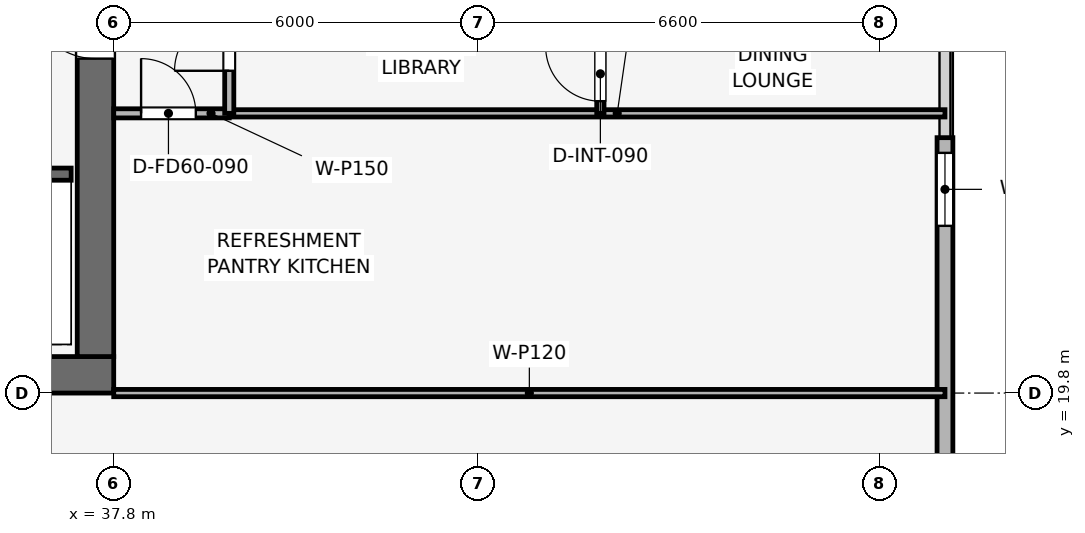
"""IFC4 building model, lengths in metres.
Left out: names, types, materials, properties, quantities, classifications, styles, units other than length and angle.
Written with IfcOpenShell. Run it as: python <this file> out.ifc"""

import sys

from ifc_helpers import new_model, si_unit, direction, frame, frame_2d, origin, place, context, subcontext, project, spatial, rectangle, extrude, element, fill, save


model = new_model("IFC4")
c1 = context("Model", 3, precision=1e-05, world=origin(), true_north=direction((0.0, 1.0)))
c2 = subcontext(c1, "Body", "Model", "MODEL_VIEW")
j1 = project(units=[si_unit("LENGTHUNIT", "METRE"), si_unit("PLANEANGLEUNIT", "RADIAN")], contexts=[c1])
p1 = place(None, origin())
s1 = spatial("IfcSite", under=j1, at=p1, CompositionType="ELEMENT")
p2 = place(p1, origin())
s2 = spatial("IfcBuilding", under=s1, at=p2, CompositionType="ELEMENT")
p3 = place(p2, frame((0.0, 0.0, 318.0)))
s3 = spatial("IfcBuildingStorey", under=s2, at=p3, CompositionType="ELEMENT", Elevation=318.0)
p4 = place(p3, frame((19.8, 20.1, 0.0), z_axis=(0.0, 0.0, 1.0), x_axis=(1.0, 0.0, 0.0)))
e1 = element("IfcWall", 1, at=p4, inside=s3, PredefinedType="SHEAR", context=c2, shape_type="SweptSolid", body=[
    extrude(rectangle(XDim=18.0, YDim=0.6, at=frame_2d((9.0, 0.0))), origin(), (0.0, 0.0, 1.0), 3.75),
])
p5 = place(p3, frame((37.5, 20.4, 0.0), z_axis=(0.0, 0.0, 1.0), x_axis=(0.0, 1.0, 0.0)))
e2 = element("IfcWall", 2, at=p5, inside=s3, PredefinedType="SHEAR", context=c2, shape_type="SweptSolid", body=[
    extrude(rectangle(XDim=16.8, YDim=0.6, at=frame_2d((8.4, 0.0))), origin(), (0.0, 0.0, 1.0), 3.75),
])
p6 = place(p5, frame((4.9, 0.0, 0.0)))
e3 = element("IfcOpeningElement", 3, at=p6, cuts=e2, PredefinedType="OPENING", context=c2, shape_type="SweptSolid", body=[
    extrude(rectangle(XDim=1.1, YDim=2.15, at=frame_2d((0.55, 1.075))), frame((0.0, 0.31, 0.0), z_axis=(0.0, -1.0, 0.0), x_axis=(1.0, 0.0, 0.0)), (0.0, 0.0, 1.0), 0.62),
])
p7 = place(p3, frame((51.47, 24.0, 0.0), z_axis=(0.0, 0.0, 1.0), x_axis=(0.0, -1.0, 0.0)))
e4 = element("IfcWall", 4, at=p7, inside=s3, PredefinedType="SOLIDWALL", context=c2, shape_type="SweptSolid", body=[
    extrude(rectangle(XDim=11.7, YDim=0.26, at=frame_2d((5.85, 0.0))), origin(), (0.0, 0.0, 1.0), 3.51),
])
p8 = place(p7, frame((0.25, 0.0, 0.9)))
e5 = element("IfcOpeningElement", 5, at=p8, cuts=e4, PredefinedType="OPENING", context=c2, shape_type="SweptSolid", body=[
    extrude(rectangle(XDim=1.2, YDim=2.1, at=frame_2d((0.6, 1.05))), frame((0.0, 0.14, 0.0), z_axis=(0.0, -1.0, 0.0), x_axis=(1.0, 0.0, 0.0)), (0.0, 0.0, 1.0), 0.28),
])
p9 = place(p3, frame((34.05, 23.4, 0.0), z_axis=(0.0, 0.0, 1.0), x_axis=(1.0, 0.0, 0.0)))
e6 = element("IfcWall", 6, at=p9, inside=s3, PredefinedType="SHEAR", context=c2, shape_type="SweptSolid", body=[
    extrude(rectangle(XDim=3.05, YDim=0.2, at=frame_2d((1.525, 0.0))), origin(), (0.0, 0.0, 1.0), 3.51),
])
p10 = place(p9, frame((1.2, 0.0, 0.0)))
e7 = element("IfcOpeningElement", 7, at=p10, cuts=e6, PredefinedType="OPENING", context=c2, shape_type="SweptSolid", body=[
    extrude(rectangle(XDim=1.1, YDim=2.15, at=frame_2d((0.55, 1.075))), frame((0.0, 0.11, 0.0), z_axis=(0.0, -1.0, 0.0), x_axis=(1.0, 0.0, 0.0)), (0.0, 0.0, 1.0), 0.22),
])
p11 = place(p3, frame((37.8, 19.8, 0.0), z_axis=(0.0, 0.0, 1.0), x_axis=(1.0, 0.0, 0.0)))
e8 = element("IfcWall", 8, at=p11, inside=s3, PredefinedType="PARTITIONING", context=c2, shape_type="SweptSolid", body=[
    extrude(rectangle(XDim=13.67, YDim=0.12, at=frame_2d((6.835, 0.0))), origin(), (0.0, 0.0, 1.0), 3.095),
])
p12 = place(p3, frame((37.8, 24.4, 0.0), z_axis=(0.0, 0.0, 1.0), x_axis=(1.0, 0.0, 0.0)))
e9 = element("IfcWall", 9, at=p12, inside=s3, PredefinedType="PARTITIONING", context=c2, shape_type="SweptSolid", body=[
    extrude(rectangle(XDim=1.9, YDim=0.15, at=frame_2d((0.95, 0.0))), origin(), (0.0, 0.0, 1.0), 3.51),
])
p13 = place(p12, frame((0.45, 0.0, 0.0)))
e10 = element("IfcOpeningElement", 10, at=p13, cuts=e9, PredefinedType="OPENING", context=c2, shape_type="SweptSolid", body=[
    extrude(rectangle(XDim=0.9, YDim=2.1, at=frame_2d((0.45, 1.05))), frame((0.0, 0.085, 0.0), z_axis=(0.0, -1.0, 0.0), x_axis=(1.0, 0.0, 0.0)), (0.0, 0.0, 1.0), 0.17),
])
p14 = place(p3, frame((39.7, 24.4, 0.0), z_axis=(0.0, 0.0, 1.0), x_axis=(1.0, 0.0, 0.0)))
e11 = element("IfcWall", 11, at=p14, inside=s3, PredefinedType="PARTITIONING", context=c2, shape_type="SweptSolid", body=[
    extrude(rectangle(XDim=11.77, YDim=0.12, at=frame_2d((5.885, 0.0))), origin(), (0.0, 0.0, 1.0), 3.135),
])
p15 = place(p3, frame((45.803, 24.4, 0.0), z_axis=(0.0, 0.0, 1.0), x_axis=(0.0, 1.0, 0.0)))
e12 = element("IfcWall", 12, at=p15, inside=s3, PredefinedType="PARTITIONING", context=c2, shape_type="SweptSolid", body=[
    extrude(rectangle(XDim=2.3, YDim=0.12, at=frame_2d((1.15, 0.0))), origin(), (0.0, 0.0, 1.0), 3.51),
])
p16 = place(p15, frame((0.2, 0.0, 0.0)))
e13 = element("IfcOpeningElement", 13, at=p16, cuts=e12, PredefinedType="OPENING", context=c2, shape_type="SweptSolid", body=[
    extrude(rectangle(XDim=0.9, YDim=2.1, at=frame_2d((0.45, 1.05))), frame((0.0, 0.07, 0.0), z_axis=(0.0, -1.0, 0.0), x_axis=(1.0, 0.0, 0.0)), (0.0, 0.0, 1.0), 0.14),
])
p17 = place(p3, frame((39.7, 24.4, 0.0), z_axis=(0.0, 0.0, 1.0), x_axis=(0.0, 1.0, 0.0)))
e14 = element("IfcWall", 14, at=p17, inside=s3, PredefinedType="PARTITIONING", context=c2, shape_type="SweptSolid", body=[
    extrude(rectangle(XDim=15.3, YDim=0.15, at=frame_2d((7.65, 0.0))), origin(), (0.0, 0.0, 1.0), 3.095),
])
p18 = place(p17, frame((0.7, 0.0, 0.0)))
e15 = element("IfcOpeningElement", 15, at=p18, cuts=e14, PredefinedType="OPENING", context=c2, shape_type="SweptSolid", body=[
    extrude(rectangle(XDim=0.9, YDim=2.1, at=frame_2d((0.45, 1.05))), frame((0.0, 0.085, 0.0), z_axis=(0.0, -1.0, 0.0), x_axis=(1.0, 0.0, 0.0)), (0.0, 0.0, 1.0), 0.17),
])
p19 = place(p17, frame((4.148, 0.0, 0.0)))
e16 = element("IfcOpeningElement", 16, at=p19, cuts=e14, PredefinedType="OPENING", context=c2, shape_type="SweptSolid", body=[
    extrude(rectangle(XDim=0.9, YDim=2.1, at=frame_2d((0.45, 1.05))), frame((0.0, 0.085, 0.0), z_axis=(0.0, -1.0, 0.0), x_axis=(1.0, 0.0, 0.0)), (0.0, 0.0, 1.0), 0.17),
])
p20 = place(p17, frame((10.648, 0.0, 0.0)))
e17 = element("IfcOpeningElement", 17, at=p20, cuts=e14, PredefinedType="OPENING", context=c2, shape_type="SweptSolid", body=[
    extrude(rectangle(XDim=0.9, YDim=2.1, at=frame_2d((0.45, 1.05))), frame((0.0, 0.085, 0.0), z_axis=(0.0, -1.0, 0.0), x_axis=(1.0, 0.0, 0.0)), (0.0, 0.0, 1.0), 0.17),
])
p21 = place(p8, origin())
e18 = element("IfcWindow", 18, at=p21, inside=s3, PartitioningType="SINGLE_PANEL", PredefinedType="WINDOW", context=c2, shape_type="SweptSolid", body=[
    extrude(rectangle(XDim=1.2, YDim=2.1, at=frame_2d((0.6, 1.05))), frame((0.0, 0.03, 0.0), z_axis=(0.0, -1.0, 0.0), x_axis=(1.0, 0.0, 0.0)), (0.0, 0.0, 1.0), 0.06),
])
fill(e5, e18)
p22 = place(p13, origin())
e19 = element("IfcDoor", 19, at=p22, inside=s3, OperationType="SINGLE_SWING_LEFT", PredefinedType="DOOR", context=c2, shape_type="SweptSolid", body=[
    extrude(rectangle(XDim=0.9, YDim=2.1, at=frame_2d((0.45, 1.05))), frame((0.0, 0.025, 0.0), z_axis=(0.0, -1.0, 0.0), x_axis=(1.0, 0.0, 0.0)), (0.0, 0.0, 1.0), 0.05),
])
fill(e10, e19)
p23 = place(p16, origin())
e20 = element("IfcDoor", 20, at=p23, inside=s3, OperationType="SINGLE_SWING_RIGHT", PredefinedType="DOOR", context=c2, shape_type="SweptSolid", body=[
    extrude(rectangle(XDim=0.9, YDim=2.1, at=frame_2d((0.45, 1.05))), frame((0.0, 0.025, 0.0), z_axis=(0.0, -1.0, 0.0), x_axis=(1.0, 0.0, 0.0)), (0.0, 0.0, 1.0), 0.05),
])
fill(e13, e20)
p24 = place(p18, origin())
e21 = element("IfcDoor", 21, at=p24, inside=s3, OperationType="SINGLE_SWING_LEFT", PredefinedType="DOOR", context=c2, shape_type="SweptSolid", body=[
    extrude(rectangle(XDim=0.9, YDim=2.1, at=frame_2d((0.45, 1.05))), frame((0.0, 0.025, 0.0), z_axis=(0.0, -1.0, 0.0), x_axis=(1.0, 0.0, 0.0)), (0.0, 0.0, 1.0), 0.05),
])
fill(e15, e21)
p25 = place(p6, origin())
e22 = element("IfcDoor", 22, at=p25, inside=s3, OperationType="SINGLE_SWING_RIGHT", PredefinedType="DOOR", context=c2, shape_type="SweptSolid", body=[
    extrude(rectangle(XDim=1.1, YDim=2.15, at=frame_2d((0.55, 1.075))), frame((0.0, 0.025, 0.0), z_axis=(0.0, -1.0, 0.0), x_axis=(1.0, 0.0, 0.0)), (0.0, 0.0, 1.0), 0.05),
])
fill(e3, e22)
save(model, sys.argv[1])
